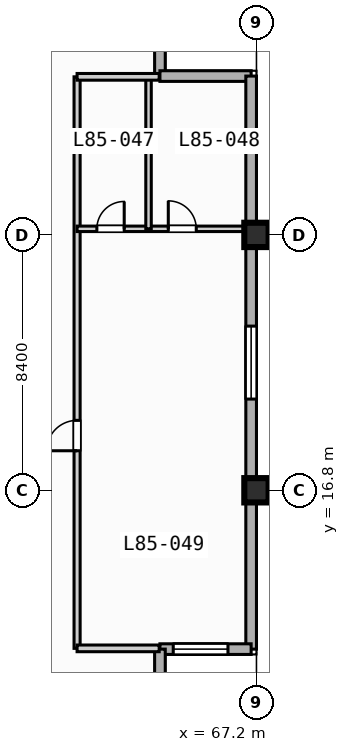
"""IFC4 building model, lengths in metres.
Left out: names, types, materials, properties, quantities, classifications, styles, units other than length and angle.
Written with IfcOpenShell. Run it as: python <this file> out.ifc"""

import sys

from ifc_helpers import new_model, si_unit, direction, frame, frame_2d, origin, origin_2d, place, context, subcontext, project, spatial, rectangle, extrude, element, fill, save


model = new_model("IFC4")
c1 = context("Model", 3, precision=1e-05, world=origin(), true_north=direction((0.0, 1.0)))
c2 = subcontext(c1, "Body", "Model", "MODEL_VIEW")
j1 = project(units=[si_unit("LENGTHUNIT", "METRE"), si_unit("PLANEANGLEUNIT", "RADIAN")], contexts=[c1])
p1 = place(None, origin())
s1 = spatial("IfcSite", under=j1, at=p1, CompositionType="ELEMENT")
p2 = place(p1, origin())
s2 = spatial("IfcBuilding", under=s1, at=p2, CompositionType="ELEMENT")
p3 = place(p2, frame((0.0, 0.0, 343.7)))
s3 = spatial("IfcBuildingStorey", under=s2, at=p3, CompositionType="ELEMENT", Elevation=343.7)
for number, where, z_axis, x_axis in (
    (1, (67.2, 16.8, 0.0), (0.0, 0.0, 1.0), (1.0, 0.0, 0.0)),
    (2, (67.2, 25.2, 0.0), (0.0, 0.0, 1.0), (1.0, 0.0, 0.0)),
):
    element("IfcColumn", number, at=place(p3, frame(where, z_axis=z_axis, x_axis=x_axis)), inside=s3, PredefinedType="COLUMN", context=c2, shape_type="SweptSolid", body=[
        extrude(rectangle(XDim=0.8, YDim=0.8, at=origin_2d()), origin(), (0.0, 0.0, 1.0), 3.9),
    ])
for number, where, z_axis, x_axis in (
    (3, (64.025, 33.425, 0.0), (0.0, 0.0, 1.0), (0.0, -1.0, 0.0)),
    (4, (64.025, 30.425, 0.0), (0.0, 0.0, 1.0), (1.0, 0.0, 0.0)),
):
    element("IfcWall", number, at=place(p3, frame(where, z_axis=z_axis, x_axis=x_axis)), inside=s3, PredefinedType="STANDARD", context=c2, shape_type="SweptSolid", body=[
        extrude(rectangle(XDim=3.0, YDim=0.35, at=frame_2d((1.5, 0.0))), origin(), (0.0, 0.0, 1.0), 3.67),
    ])
p4 = place(p3, frame((67.025, 30.425, 0.0), z_axis=(0.0, 0.0, 1.0), x_axis=(0.0, -1.0, 0.0)))
e5 = element("IfcWall", 5, at=p4, inside=s3, PredefinedType="STANDARD", context=c2, shape_type="SweptSolid", body=[
    extrude(rectangle(XDim=18.85, YDim=0.35, at=frame_2d((9.425, 0.0))), origin(), (0.0, 0.0, 1.0), 3.67),
])
p5 = place(p4, frame((8.225, 0.0, 0.85)))
e6 = element("IfcOpeningElement", 6, at=p5, cuts=e5, PredefinedType="OPENING", context=c2, shape_type="SweptSolid", body=[
    extrude(rectangle(XDim=2.4, YDim=1.95, at=frame_2d((1.2, 0.975))), frame((0.0, 0.185, 0.0), z_axis=(0.0, -1.0, 0.0), x_axis=(1.0, 0.0, 0.0)), (0.0, 0.0, 1.0), 0.37),
])
p6 = place(p3, frame((67.025, 11.575, 0.0), z_axis=(0.0, 0.0, 1.0), x_axis=(-1.0, 0.0, 0.0)))
e7 = element("IfcWall", 7, at=p6, inside=s3, PredefinedType="STANDARD", context=c2, shape_type="SweptSolid", body=[
    extrude(rectangle(XDim=3.0, YDim=0.35, at=frame_2d((1.5, 0.0))), origin(), (0.0, 0.0, 1.0), 3.67),
])
p7 = place(p6, frame((0.762, 0.0, 0.85)))
e8 = element("IfcOpeningElement", 8, at=p7, cuts=e7, PredefinedType="OPENING", context=c2, shape_type="SweptSolid", body=[
    extrude(rectangle(XDim=1.8, YDim=1.8, at=frame_2d((0.9, 0.9))), frame((0.0, 0.185, 0.0), z_axis=(0.0, -1.0, 0.0), x_axis=(1.0, 0.0, 0.0)), (0.0, 0.0, 1.0), 0.37),
])
p8 = place(p3, frame((64.025, 11.575, 0.0), z_axis=(0.0, 0.0, 1.0), x_axis=(0.0, -1.0, 0.0)))
e9 = element("IfcWall", 9, at=p8, inside=s3, PredefinedType="STANDARD", context=c2, shape_type="SweptSolid", body=[
    extrude(rectangle(XDim=3.0, YDim=0.35, at=frame_2d((1.5, 0.0))), origin(), (0.0, 0.0, 1.0), 3.67),
])
p9 = place(p3, frame((61.3, 11.6, 0.0), z_axis=(0.0, 0.0, 1.0), x_axis=(0.0, 1.0, 0.0)))
e10 = element("IfcWall", 10, at=p9, inside=s3, PredefinedType="PARTITIONING", context=c2, shape_type="SweptSolid", body=[
    extrude(rectangle(XDim=18.8, YDim=0.2, at=frame_2d((9.4, 0.0))), origin(), (0.0, 0.0, 1.0), 3.67),
])
p10 = place(p9, frame((6.5, 0.0, 0.0)))
e11 = element("IfcOpeningElement", 11, at=p10, cuts=e10, PredefinedType="OPENING", context=c2, shape_type="SweptSolid", body=[
    extrude(rectangle(XDim=1.0, YDim=2.15, at=frame_2d((0.5, 1.075))), frame((0.0, 0.11, 0.0), z_axis=(0.0, -1.0, 0.0), x_axis=(1.0, 0.0, 0.0)), (0.0, 0.0, 1.0), 0.22),
])
p11 = place(p3, frame((61.3, 25.4, 0.0), z_axis=(0.0, 0.0, 1.0), x_axis=(1.0, 0.0, 0.0)))
e12 = element("IfcWall", 12, at=p11, inside=s3, PredefinedType="PLUMBINGWALL", context=c2, shape_type="SweptSolid", body=[
    extrude(rectangle(XDim=5.5, YDim=0.18, at=frame_2d((2.75, 0.0))), origin(), (0.0, 0.0, 1.0), 3.053),
])
p12 = place(p11, frame((0.65, 0.0, 0.0)))
e13 = element("IfcOpeningElement", 13, at=p12, cuts=e12, PredefinedType="OPENING", context=c2, shape_type="SweptSolid", body=[
    extrude(rectangle(XDim=0.9, YDim=2.1, at=frame_2d((0.45, 1.05))), frame((0.0, 0.1, 0.0), z_axis=(0.0, -1.0, 0.0), x_axis=(1.0, 0.0, 0.0)), (0.0, 0.0, 1.0), 0.2),
])
p13 = place(p11, frame((3.0, 0.0, 0.0)))
e14 = element("IfcOpeningElement", 14, at=p13, cuts=e12, PredefinedType="OPENING", context=c2, shape_type="SweptSolid", body=[
    extrude(rectangle(XDim=0.92, YDim=2.1, at=frame_2d((0.46, 1.05))), frame((0.0, 0.1, 0.0), z_axis=(0.0, -1.0, 0.0), x_axis=(1.0, 0.0, 0.0)), (0.0, 0.0, 1.0), 0.2),
])
p14 = place(p3, frame((63.65, 25.4, 0.0), z_axis=(0.0, 0.0, 1.0), x_axis=(0.0, 1.0, 0.0)))
e15 = element("IfcWall", 15, at=p14, inside=s3, PredefinedType="PLUMBINGWALL", context=c2, shape_type="SweptSolid", body=[
    extrude(rectangle(XDim=5.0, YDim=0.18, at=frame_2d((2.5, 0.0))), origin(), (0.0, 0.0, 1.0), 3.67),
])
for number, where, z_axis, x_axis in (
    (16, (61.3, 11.6, 0.0), (0.0, 0.0, 1.0), (1.0, 0.0, 0.0)),
    (17, (61.3, 30.4, 0.0), (0.0, 0.0, 1.0), (1.0, 0.0, 0.0)),
):
    element("IfcWall", number, at=place(p3, frame(where, z_axis=z_axis, x_axis=x_axis)), inside=s3, PredefinedType="PARTITIONING", context=c2, shape_type="SweptSolid", body=[
        extrude(rectangle(XDim=2.7, YDim=0.22, at=frame_2d((1.35, 0.0))), origin(), (0.0, 0.0, 1.0), 3.67),
    ])
p15 = place(p5, origin())
e18 = element("IfcWindow", 18, at=p15, inside=s3, PartitioningType="SINGLE_PANEL", PredefinedType="WINDOW", context=c2, shape_type="SweptSolid", body=[
    extrude(rectangle(XDim=2.4, YDim=1.95, at=frame_2d((1.2, 0.975))), frame((0.0, 0.03, 0.0), z_axis=(0.0, -1.0, 0.0), x_axis=(1.0, 0.0, 0.0)), (0.0, 0.0, 1.0), 0.06),
])
fill(e6, e18)
p16 = place(p7, origin())
e19 = element("IfcWindow", 19, at=p16, inside=s3, PartitioningType="SINGLE_PANEL", PredefinedType="WINDOW", context=c2, shape_type="SweptSolid", body=[
    extrude(rectangle(XDim=1.8, YDim=1.8, at=frame_2d((0.9, 0.9))), frame((0.0, 0.03, 0.0), z_axis=(0.0, -1.0, 0.0), x_axis=(1.0, 0.0, 0.0)), (0.0, 0.0, 1.0), 0.06),
])
fill(e8, e19)
p17 = place(p10, origin())
e20 = element("IfcDoor", 20, at=p17, inside=s3, OperationType="SINGLE_SWING_LEFT", PredefinedType="DOOR", context=c2, shape_type="SweptSolid", body=[
    extrude(rectangle(XDim=1.0, YDim=2.15, at=frame_2d((0.5, 1.075))), frame((0.0, 0.025, 0.0), z_axis=(0.0, -1.0, 0.0), x_axis=(1.0, 0.0, 0.0)), (0.0, 0.0, 1.0), 0.05),
])
fill(e11, e20)
p18 = place(p12, origin())
e21 = element("IfcDoor", 21, at=p18, inside=s3, OperationType="SINGLE_SWING_RIGHT", PredefinedType="DOOR", context=c2, shape_type="SweptSolid", body=[
    extrude(rectangle(XDim=0.9, YDim=2.1, at=frame_2d((0.45, 1.05))), frame((0.0, 0.025, 0.0), z_axis=(0.0, -1.0, 0.0), x_axis=(1.0, 0.0, 0.0)), (0.0, 0.0, 1.0), 0.05),
])
fill(e13, e21)
p19 = place(p13, origin())
e22 = element("IfcDoor", 22, at=p19, inside=s3, OperationType="SINGLE_SWING_LEFT", PredefinedType="DOOR", context=c2, shape_type="SweptSolid", body=[
    extrude(rectangle(XDim=0.92, YDim=2.1, at=frame_2d((0.46, 1.05))), frame((0.0, 0.025, 0.0), z_axis=(0.0, -1.0, 0.0), x_axis=(1.0, 0.0, 0.0)), (0.0, 0.0, 1.0), 0.05),
])
fill(e14, e22)
save(model, sys.argv[1])
